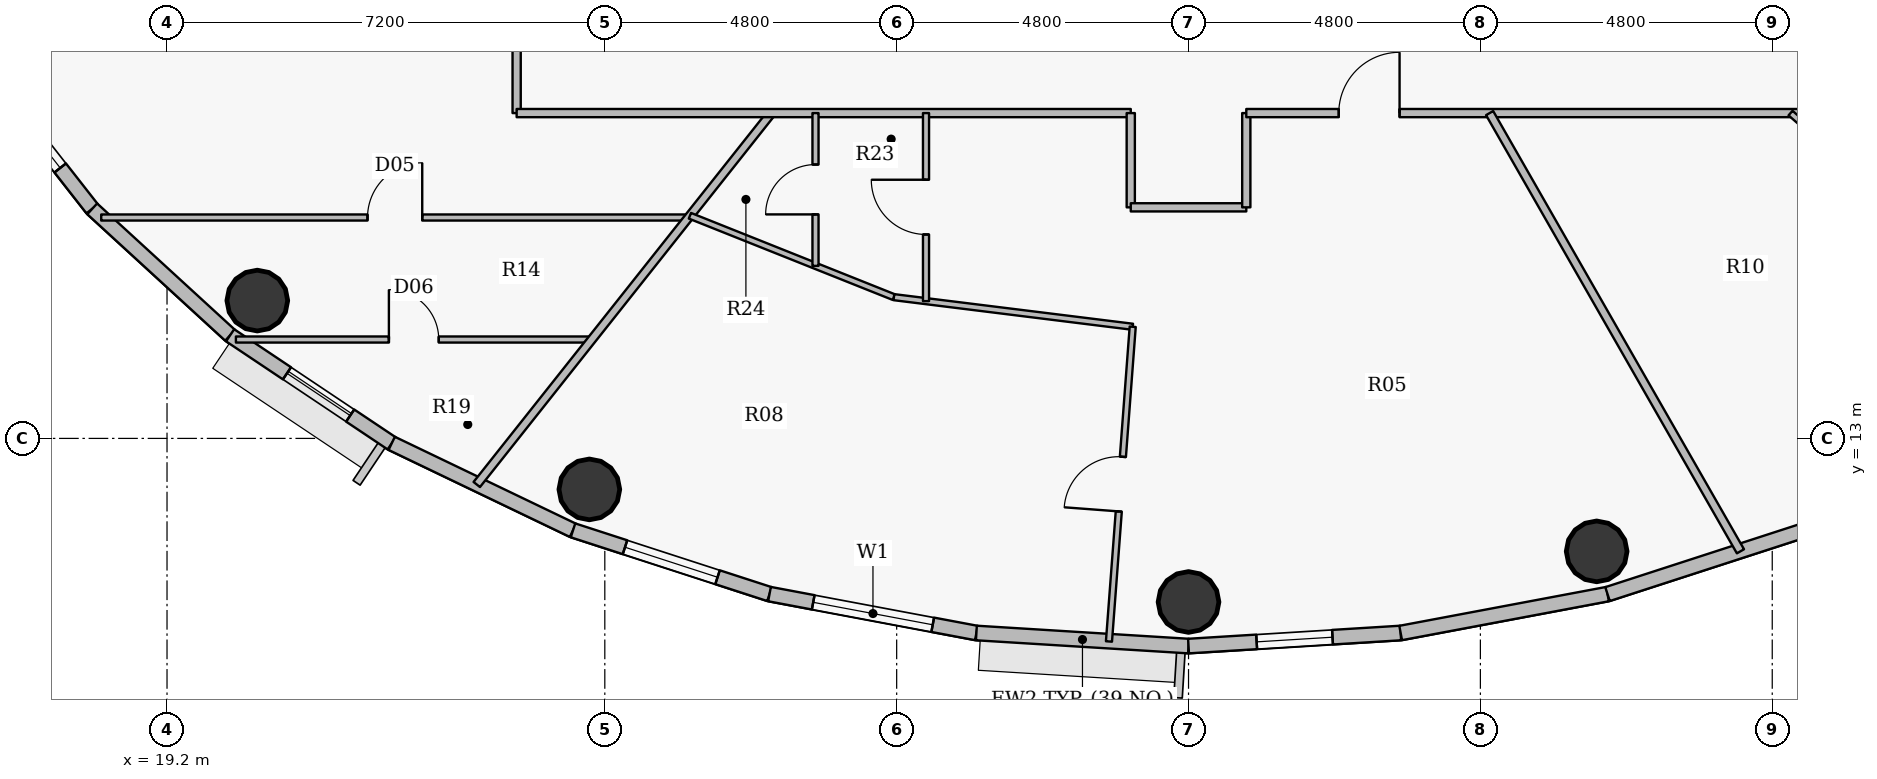
"""IFC4 building model, lengths in metres.
Left out: names, types, materials, properties, quantities, classifications, styles, units other than length and angle.
Written with IfcOpenShell. Run it as: python <this file> out.ifc"""

import sys

from ifc_helpers import new_model, si_unit, direction, frame, frame_2d, origin, origin_2d, place, context, subcontext, project, spatial, rectangle, hollow_circle, extrude, source, transform, mapped, element, fill, save


model = new_model("IFC4")
c1 = context("Model", 3, precision=1e-05, world=origin(), true_north=direction((0.0, 1.0)))
c2 = subcontext(c1, "Body", "Model", "MODEL_VIEW")
j1 = project(units=[si_unit("LENGTHUNIT", "METRE"), si_unit("PLANEANGLEUNIT", "RADIAN")], contexts=[c1])
p1 = place(None, origin())
s1 = spatial("IfcSite", under=j1, at=p1, CompositionType="ELEMENT")
p2 = place(p1, origin())
s2 = spatial("IfcBuilding", under=s1, at=p2, CompositionType="ELEMENT")
p3 = place(p2, frame((0.0, 0.0, 280.5)))
s3 = spatial("IfcBuildingStorey", under=s2, at=p3, CompositionType="ELEMENT", Elevation=280.5)
for number, where, z_axis, x_axis in (
    (1, (20.685, 15.267, 0.0), (0.0, 0.0, 1.0), (1.0, 0.0, 0.0)),
    (2, (26.146, 12.161, 0.0), (0.0, 0.0, 1.0), (1.0, 0.0, 0.0)),
    (3, (36.0, 10.31, 0.0), (0.0, 0.0, 1.0), (1.0, 0.0, 0.0)),
    (4, (42.712, 11.142, 0.0), (0.0, 0.0, 1.0), (1.0, 0.0, 0.0)),
):
    element("IfcColumn", number, at=place(p3, frame(where, z_axis=z_axis, x_axis=x_axis)), inside=s3, PredefinedType="COLUMN", context=c2, shape_type="SweptSolid", body=[
        extrude(hollow_circle(Radius=0.5, WallThickness=0.032, at=origin_2d()), origin(), (0.0, 0.0, 1.0), 3.75),
    ])
p4 = place(p3, frame((17.97, 16.775, 0.0), z_axis=(0.0, 0.0, 1.0), x_axis=(-0.616337186556, 0.787482363275, 0.0)))
e5 = element("IfcWall", 5, at=p4, inside=s3, PredefinedType="SOLIDWALL", context=c2, shape_type="SweptSolid", body=[
    extrude(rectangle(XDim=2.958, YDim=0.24, at=frame_2d((1.479, 0.0))), origin(), (0.0, 0.0, 1.0), 3.5),
])
p5 = place(p4, frame((0.854, 0.0, 0.9)))
e6 = element("IfcOpeningElement", 6, at=p5, cuts=e5, PredefinedType="OPENING", context=c2, shape_type="SweptSolid", body=[
    extrude(rectangle(XDim=1.25, YDim=1.65, at=origin_2d()), frame((0.625, 0.13, 0.825), z_axis=(0.0, -1.0, 0.0), x_axis=(1.0, 0.0, 0.0)), (0.0, 0.0, 1.0), 0.26),
])
p6 = place(p3, frame((20.238, 14.696, 0.0), z_axis=(0.0, 0.0, 1.0), x_axis=(-0.737068506972, 0.675818034703, 0.0)))
e7 = element("IfcWall", 7, at=p6, inside=s3, PredefinedType="SOLIDWALL", context=c2, shape_type="SweptSolid", body=[
    extrude(rectangle(XDim=3.077, YDim=0.24, at=frame_2d((1.539, 0.0))), origin(), (0.0, 0.0, 1.0), 3.5),
])
p7 = place(p3, frame((22.896, 12.918, 0.0), z_axis=(0.0, 0.0, 1.0), x_axis=(-0.831250592635, 0.55589787933, 0.0)))
e8 = element("IfcWall", 8, at=p7, inside=s3, PredefinedType="SOLIDWALL", context=c2, shape_type="SweptSolid", body=[
    extrude(rectangle(XDim=3.197, YDim=0.24, at=frame_2d((1.599, 0.0))), origin(), (0.0, 0.0, 1.0), 3.5),
])
p8 = place(p7, frame((0.822, 0.0, 0.9)))
e9 = element("IfcOpeningElement", 9, at=p8, cuts=e8, PredefinedType="OPENING", context=c2, shape_type="SweptSolid", body=[
    extrude(rectangle(XDim=1.25, YDim=1.65, at=origin_2d()), frame((0.625, 0.13, 0.825), z_axis=(0.0, -1.0, 0.0), x_axis=(1.0, 0.0, 0.0)), (0.0, 0.0, 1.0), 0.26),
])
p9 = place(p3, frame((25.877, 11.488, 0.0), z_axis=(0.0, 0.0, 1.0), x_axis=(-0.901573741254, 0.43262546051, 0.0)))
e10 = element("IfcWall", 10, at=p9, inside=s3, PredefinedType="SOLIDWALL", context=c2, shape_type="SweptSolid", body=[
    extrude(rectangle(XDim=3.307, YDim=0.24, at=frame_2d((1.653, 0.0))), origin(), (0.0, 0.0, 1.0), 3.5),
])
p10 = place(p3, frame((29.109, 10.44, 0.0), z_axis=(0.0, 0.0, 1.0), x_axis=(-0.95123136723, 0.308478339592, 0.0)))
e11 = element("IfcWall", 11, at=p10, inside=s3, PredefinedType="SOLIDWALL", context=c2, shape_type="SweptSolid", body=[
    extrude(rectangle(XDim=3.398, YDim=0.24, at=frame_2d((1.699, 0.0))), origin(), (0.0, 0.0, 1.0), 3.5),
])
p11 = place(p10, frame((0.899, 0.0, 0.9)))
e12 = element("IfcOpeningElement", 12, at=p11, cuts=e11, PredefinedType="OPENING", context=c2, shape_type="SweptSolid", body=[
    extrude(rectangle(XDim=1.6, YDim=1.75, at=origin_2d()), frame((0.8, 0.13, 0.875), z_axis=(0.0, -1.0, 0.0), x_axis=(1.0, 0.0, 0.0)), (0.0, 0.0, 1.0), 0.26),
])
p12 = place(p3, frame((32.511, 9.8, 0.0), z_axis=(0.0, 0.0, 1.0), x_axis=(-0.982782655757, 0.184765395959, 0.0)))
e13 = element("IfcWall", 13, at=p12, inside=s3, PredefinedType="SOLIDWALL", context=c2, shape_type="SweptSolid", body=[
    extrude(rectangle(XDim=3.462, YDim=0.24, at=frame_2d((1.731, 0.0))), origin(), (0.0, 0.0, 1.0), 3.5),
])
p13 = place(p12, frame((0.731, 0.0, 0.9)))
e14 = element("IfcOpeningElement", 14, at=p13, cuts=e13, PredefinedType="OPENING", context=c2, shape_type="SweptSolid", body=[
    extrude(rectangle(XDim=2.0, YDim=1.75, at=origin_2d()), frame((1.0, 0.13, 0.875), z_axis=(0.0, -1.0, 0.0), x_axis=(1.0, 0.0, 0.0)), (0.0, 0.0, 1.0), 0.26),
])
p14 = place(p3, frame((36.0, 9.585, 0.0), z_axis=(0.0, 0.0, 1.0), x_axis=(-0.998104946479, 0.061534671648, 0.0)))
e15 = element("IfcWall", 15, at=p14, inside=s3, PredefinedType="SOLIDWALL", context=c2, shape_type="SweptSolid", body=[
    extrude(rectangle(XDim=3.495, YDim=0.24, at=frame_2d((1.748, 0.0))), origin(), (0.0, 0.0, 1.0), 3.5),
])
p15 = place(p3, frame((39.489, 9.8, 0.0), z_axis=(0.0, 0.0, 1.0), x_axis=(-0.998104946479, -0.061534671648, 0.0)))
e16 = element("IfcWall", 16, at=p15, inside=s3, PredefinedType="SOLIDWALL", context=c2, shape_type="SweptSolid", body=[
    extrude(rectangle(XDim=3.495, YDim=0.24, at=frame_2d((1.748, 0.0))), origin(), (0.0, 0.0, 1.0), 3.5),
])
p16 = place(p15, frame((1.123, 0.0, 0.9)))
e17 = element("IfcOpeningElement", 17, at=p16, cuts=e16, PredefinedType="OPENING", context=c2, shape_type="SweptSolid", body=[
    extrude(rectangle(XDim=1.25, YDim=1.65, at=origin_2d()), frame((0.625, 0.13, 0.825), z_axis=(0.0, -1.0, 0.0), x_axis=(1.0, 0.0, 0.0)), (0.0, 0.0, 1.0), 0.26),
])
p17 = place(p3, frame((42.891, 10.44, 0.0), z_axis=(0.0, 0.0, 1.0), x_axis=(-0.982782655757, -0.184765395959, 0.0)))
e18 = element("IfcWall", 18, at=p17, inside=s3, PredefinedType="SOLIDWALL", context=c2, shape_type="SweptSolid", body=[
    extrude(rectangle(XDim=3.462, YDim=0.24, at=frame_2d((1.731, 0.0))), origin(), (0.0, 0.0, 1.0), 3.5),
])
p18 = place(p3, frame((46.123, 11.488, 0.0), z_axis=(0.0, 0.0, 1.0), x_axis=(-0.95123136723, -0.308478339592, 0.0)))
e19 = element("IfcWall", 19, at=p18, inside=s3, PredefinedType="SOLIDWALL", context=c2, shape_type="SweptSolid", body=[
    extrude(rectangle(XDim=3.398, YDim=0.24, at=frame_2d((1.699, 0.0))), origin(), (0.0, 0.0, 1.0), 3.5),
])
p19 = place(p3, frame((18.118, 16.633, 0.0), z_axis=(0.0, 0.0, 1.0), x_axis=(1.0, 0.0, 0.0)))
e20 = element("IfcWall", 20, at=p19, inside=s3, PredefinedType="PARTITIONING", context=c2, shape_type="SweptSolid", body=[
    extrude(rectangle(XDim=9.659, YDim=0.1, at=frame_2d((4.83, 0.0))), origin(), (0.0, 0.0, 1.0), 2.985),
])
p20 = place(p19, frame((4.379, 0.0, 0.0)))
e21 = element("IfcOpeningElement", 21, at=p20, cuts=e20, PredefinedType="OPENING", context=c2, shape_type="SweptSolid", body=[
    extrude(rectangle(XDim=0.9, YDim=2.1, at=origin_2d()), frame((0.45, 0.06, 1.05), z_axis=(0.0, -1.0, 0.0), x_axis=(1.0, 0.0, 0.0)), (0.0, 0.0, 1.0), 0.12),
])
p21 = place(p3, frame((20.333, 14.626, 0.0), z_axis=(0.0, 0.0, 1.0), x_axis=(1.0, 0.0, 0.0)))
e22 = element("IfcWall", 22, at=p21, inside=s3, PredefinedType="PARTITIONING", context=c2, shape_type="SweptSolid", body=[
    extrude(rectangle(XDim=5.852, YDim=0.1, at=frame_2d((2.926, 0.0))), origin(), (0.0, 0.0, 1.0), 2.985),
])
p22 = place(p21, frame((2.516, 0.0, 0.0)))
e23 = element("IfcOpeningElement", 23, at=p22, cuts=e22, PredefinedType="OPENING", context=c2, shape_type="SweptSolid", body=[
    extrude(rectangle(XDim=0.82, YDim=2.1, at=origin_2d()), frame((0.41, 0.06, 1.05), z_axis=(0.0, -1.0, 0.0), x_axis=(1.0, 0.0, 0.0)), (0.0, 0.0, 1.0), 0.12),
])
p23 = place(p3, frame((24.294, 12.242, 0.0), z_axis=(0.0, 0.0, 1.0), x_axis=(0.621439784824, 0.783461928774, 0.0)))
e24 = element("IfcWall", 24, at=p23, inside=s3, PredefinedType="PARTITIONING", context=c2, shape_type="SweptSolid", body=[
    extrude(rectangle(XDim=7.796, YDim=0.135, at=frame_2d((3.898, 0.0))), origin(), (0.0, 0.0, 1.0), 2.985),
])
p24 = place(p3, frame((24.95, 18.35, 0.0), z_axis=(0.0, 0.0, 1.0), x_axis=(0.0, 1.0, 0.0)))
e25 = element("IfcWall", 25, at=p24, inside=s3, PredefinedType="PARTITIONING", context=c2, shape_type="SweptSolid", body=[
    extrude(rectangle(XDim=17.3, YDim=0.135, at=frame_2d((8.65, 0.0))), origin(), (0.0, 0.0, 1.0), 3.035),
])
p25 = place(p24, frame((5.495, 0.0, 0.0)))
e26 = element("IfcOpeningElement", 26, at=p25, cuts=e25, PredefinedType="OPENING", context=c2, shape_type="SweptSolid", body=[
    extrude(rectangle(XDim=1.0, YDim=2.15, at=origin_2d()), frame((0.5, 0.078, 1.075), z_axis=(0.0, -1.0, 0.0), x_axis=(1.0, 0.0, 0.0)), (0.0, 0.0, 1.0), 0.155),
])
p26 = place(p3, frame((24.95, 18.35, 0.0), z_axis=(0.0, 0.0, 1.0), x_axis=(1.0, 0.0, 0.0)))
e27 = element("IfcWall", 27, at=p26, inside=s3, PredefinedType="PARTITIONING", context=c2, shape_type="SweptSolid", body=[
    extrude(rectangle(XDim=10.1, YDim=0.135, at=frame_2d((5.05, 0.0))), origin(), (0.0, 0.0, 1.0), 3.035),
])
p27 = place(p3, frame((27.8, 16.662, 0.0), z_axis=(0.0, 0.0, 1.0), x_axis=(0.928783988526, -0.370621508628, 0.0)))
e28 = element("IfcWall", 28, at=p27, inside=s3, PredefinedType="PARTITIONING", context=c2, shape_type="SweptSolid", body=[
    extrude(rectangle(XDim=3.613, YDim=0.1, at=frame_2d((1.806, 0.0))), origin(), (0.0, 0.0, 1.0), 3.035),
])
p28 = place(p3, frame((29.865, 15.837, 0.0), z_axis=(0.0, 0.0, 1.0), x_axis=(0.0, 1.0, 0.0)))
e29 = element("IfcWall", 29, at=p28, inside=s3, PredefinedType="PARTITIONING", context=c2, shape_type="SweptSolid", body=[
    extrude(rectangle(XDim=2.513, YDim=0.1, at=frame_2d((1.256, 0.0))), origin(), (0.0, 0.0, 1.0), 3.035),
])
p29 = place(p28, frame((0.846, 0.0, 0.0)))
e30 = element("IfcOpeningElement", 30, at=p29, cuts=e29, PredefinedType="OPENING", context=c2, shape_type="SweptSolid", body=[
    extrude(rectangle(XDim=0.82, YDim=2.1, at=origin_2d()), frame((0.41, 0.06, 1.05), z_axis=(0.0, -1.0, 0.0), x_axis=(1.0, 0.0, 0.0)), (0.0, 0.0, 1.0), 0.12),
])
p30 = place(p3, frame((31.155, 15.323, 0.0), z_axis=(0.0, 0.0, 1.0), x_axis=(0.992397939869, -0.123070422704, 0.0)))
e31 = element("IfcWall", 31, at=p30, inside=s3, PredefinedType="PARTITIONING", context=c2, shape_type="SweptSolid", body=[
    extrude(rectangle(XDim=3.958, YDim=0.1, at=frame_2d((1.979, 0.0))), origin(), (0.0, 0.0, 1.0), 3.5),
])
p31 = place(p3, frame((31.683, 15.258, 0.0), z_axis=(0.0, 0.0, 1.0), x_axis=(0.0, 1.0, 0.0)))
e32 = element("IfcWall", 32, at=p31, inside=s3, PredefinedType="PARTITIONING", context=c2, shape_type="SweptSolid", body=[
    extrude(rectangle(XDim=3.093, YDim=0.1, at=frame_2d((1.546, 0.0))), origin(), (0.0, 0.0, 1.0), 3.5),
])
p32 = place(p31, frame((1.096, 0.0, 0.0)))
e33 = element("IfcOpeningElement", 33, at=p32, cuts=e32, PredefinedType="OPENING", context=c2, shape_type="SweptSolid", body=[
    extrude(rectangle(XDim=0.9, YDim=2.1, at=origin_2d()), frame((0.45, 0.06, 1.05), z_axis=(0.0, -1.0, 0.0), x_axis=(1.0, 0.0, 0.0)), (0.0, 0.0, 1.0), 0.12),
])
p33 = place(p3, frame((34.691, 9.661, 0.0), z_axis=(0.0, 0.0, 1.0), x_axis=(0.0752647297, 0.997163587614, 0.0)))
e34 = element("IfcWall", 34, at=p33, inside=s3, PredefinedType="PARTITIONING", context=c2, shape_type="SweptSolid", body=[
    extrude(rectangle(XDim=5.19, YDim=0.1, at=frame_2d((2.595, 0.0))), origin(), (0.0, 0.0, 1.0), 2.985),
])
p34 = place(p33, frame((2.145, 0.0, 0.0)))
e35 = element("IfcOpeningElement", 35, at=p34, cuts=e34, PredefinedType="OPENING", context=c2, shape_type="SweptSolid", body=[
    extrude(rectangle(XDim=0.9, YDim=2.1, at=origin_2d()), frame((0.45, 0.06, 1.05), z_axis=(0.0, -1.0, 0.0), x_axis=(1.0, 0.0, 0.0)), (0.0, 0.0, 1.0), 0.12),
])
p35 = place(p3, frame((35.05, 16.8, 0.0), z_axis=(0.0, 0.0, 1.0), x_axis=(0.0, 1.0, 0.0)))
e36 = element("IfcWall", 36, at=p35, inside=s3, PredefinedType="PARTITIONING", context=c2, shape_type="SweptSolid", body=[
    extrude(rectangle(XDim=1.55, YDim=0.135, at=frame_2d((0.775, 0.0))), origin(), (0.0, 0.0, 1.0), 3.5),
])
p36 = place(p3, frame((35.05, 16.8, 0.0), z_axis=(0.0, 0.0, 1.0), x_axis=(1.0, 0.0, 0.0)))
e37 = element("IfcWall", 37, at=p36, inside=s3, PredefinedType="PARTITIONING", context=c2, shape_type="SweptSolid", body=[
    extrude(rectangle(XDim=1.9, YDim=0.135, at=frame_2d((0.95, 0.0))), origin(), (0.0, 0.0, 1.0), 3.035),
])
p37 = place(p3, frame((36.95, 16.8, 0.0), z_axis=(0.0, 0.0, 1.0), x_axis=(0.0, 1.0, 0.0)))
e38 = element("IfcWall", 38, at=p37, inside=s3, PredefinedType="PARTITIONING", context=c2, shape_type="SweptSolid", body=[
    extrude(rectangle(XDim=1.55, YDim=0.135, at=frame_2d((0.775, 0.0))), origin(), (0.0, 0.0, 1.0), 3.5),
])
p38 = place(p3, frame((36.95, 18.35, 0.0), z_axis=(0.0, 0.0, 1.0), x_axis=(1.0, 0.0, 0.0)))
e39 = element("IfcWall", 39, at=p38, inside=s3, PredefinedType="PARTITIONING", context=c2, shape_type="SweptSolid", body=[
    extrude(rectangle(XDim=10.1, YDim=0.135, at=frame_2d((5.05, 0.0))), origin(), (0.0, 0.0, 1.0), 3.035),
])
p39 = place(p38, frame((1.521, 0.0, 0.0)))
e40 = element("IfcOpeningElement", 40, at=p39, cuts=e39, PredefinedType="OPENING", context=c2, shape_type="SweptSolid", body=[
    extrude(rectangle(XDim=1.0, YDim=2.15, at=origin_2d()), frame((0.5, 0.078, 1.075), z_axis=(0.0, -1.0, 0.0), x_axis=(1.0, 0.0, 0.0)), (0.0, 0.0, 1.0), 0.155),
])
p40 = place(p3, frame((40.952, 18.35, 0.0), z_axis=(0.0, 0.0, 1.0), x_axis=(0.496803688517, -0.867862947173, 0.0)))
e41 = element("IfcWall", 41, at=p40, inside=s3, PredefinedType="PARTITIONING", context=c2, shape_type="SweptSolid", body=[
    extrude(rectangle(XDim=8.304, YDim=0.135, at=frame_2d((4.152, 0.0))), origin(), (0.0, 0.0, 1.0), 2.985),
])
p41 = place(p3, frame((45.901, 18.35, 0.0), z_axis=(0.0, 0.0, 1.0), x_axis=(0.753056223084, -0.657956172457, 0.0)))
e42 = element("IfcWall", 42, at=p41, inside=s3, PredefinedType="PARTITIONING", context=c2, shape_type="SweptSolid", body=[
    extrude(rectangle(XDim=6.526, YDim=0.1, at=frame_2d((3.263, 0.0))), origin(), (0.0, 0.0, 1.0), 2.985),
])
p42 = place(p41, frame((2.813, 0.0, 0.0)))
e43 = element("IfcOpeningElement", 43, at=p42, cuts=e42, PredefinedType="OPENING", context=c2, shape_type="SweptSolid", body=[
    extrude(rectangle(XDim=0.9, YDim=2.1, at=origin_2d()), frame((0.45, 0.06, 1.05), z_axis=(0.0, -1.0, 0.0), x_axis=(1.0, 0.0, 0.0)), (0.0, 0.0, 1.0), 0.12),
])
m1 = source(origin(), c2, "Body", "SweptSolid", [
    extrude(rectangle(XDim=1.25, YDim=1.65, at=origin_2d()), frame((0.625, 0.03, 0.825), z_axis=(0.0, -1.0, 0.0), x_axis=(1.0, 0.0, 0.0)), (0.0, 0.0, 1.0), 0.06),
])
p43 = place(p5, origin())
e44 = element("IfcWindow", 44, at=p43, inside=s3, PartitioningType="SINGLE_PANEL", PredefinedType="WINDOW", context=c2, shape_type="MappedRepresentation", body=[
    mapped(m1, transform((0.0, 0.0, 0.0), x_axis=(1.0, 0.0, 0.0), y_axis=(0.0, 1.0, 0.0), z_axis=(0.0, 0.0, 1.0), scale=1.0)),
])
fill(e6, e44)
p44 = place(p8, origin())
e45 = element("IfcWindow", 45, at=p44, inside=s3, PartitioningType="SINGLE_PANEL", PredefinedType="WINDOW", context=c2, shape_type="MappedRepresentation", body=[
    mapped(m1, transform((0.0, 0.0, 0.0), x_axis=(1.0, 0.0, 0.0), y_axis=(0.0, 1.0, 0.0), z_axis=(0.0, 0.0, 1.0), scale=1.0)),
])
fill(e9, e45)
m2 = source(origin(), c2, "Body", "SweptSolid", [
    extrude(rectangle(XDim=1.6, YDim=1.75, at=origin_2d()), frame((0.8, 0.03, 0.875), z_axis=(0.0, -1.0, 0.0), x_axis=(1.0, 0.0, 0.0)), (0.0, 0.0, 1.0), 0.06),
])
p45 = place(p11, origin())
e46 = element("IfcWindow", 46, at=p45, inside=s3, PartitioningType="DOUBLE_PANEL_VERTICAL", PredefinedType="WINDOW", context=c2, shape_type="MappedRepresentation", body=[
    mapped(m2, transform((0.0, 0.0, 0.0), x_axis=(1.0, 0.0, 0.0), y_axis=(0.0, 1.0, 0.0), z_axis=(0.0, 0.0, 1.0), scale=1.0)),
])
fill(e12, e46)
m3 = source(origin(), c2, "Body", "SweptSolid", [
    extrude(rectangle(XDim=2.0, YDim=1.75, at=origin_2d()), frame((1.0, 0.03, 0.875), z_axis=(0.0, -1.0, 0.0), x_axis=(1.0, 0.0, 0.0)), (0.0, 0.0, 1.0), 0.06),
])
p46 = place(p13, origin())
e47 = element("IfcWindow", 47, at=p46, inside=s3, PartitioningType="DOUBLE_PANEL_VERTICAL", PredefinedType="WINDOW", context=c2, shape_type="MappedRepresentation", body=[
    mapped(m3, transform((0.0, 0.0, 0.0), x_axis=(1.0, 0.0, 0.0), y_axis=(0.0, 1.0, 0.0), z_axis=(0.0, 0.0, 1.0), scale=1.0)),
])
fill(e14, e47)
p47 = place(p16, origin())
e48 = element("IfcWindow", 48, at=p47, inside=s3, PartitioningType="SINGLE_PANEL", PredefinedType="WINDOW", context=c2, shape_type="MappedRepresentation", body=[
    mapped(m1, transform((0.0, 0.0, 0.0), x_axis=(1.0, 0.0, 0.0), y_axis=(0.0, 1.0, 0.0), z_axis=(0.0, 0.0, 1.0), scale=1.0)),
])
fill(e17, e48)
m4 = source(origin(), c2, "Body", "SweptSolid", [
    extrude(rectangle(XDim=0.9, YDim=2.1, at=origin_2d()), frame((0.45, 0.025, 1.05), z_axis=(0.0, -1.0, 0.0), x_axis=(1.0, 0.0, 0.0)), (0.0, 0.0, 1.0), 0.05),
])
p48 = place(p20, origin())
e49 = element("IfcDoor", 49, at=p48, inside=s3, OperationType="SINGLE_SWING_RIGHT", PredefinedType="DOOR", context=c2, shape_type="MappedRepresentation", body=[
    mapped(m4, transform((0.0, 0.0, 0.0), x_axis=(1.0, 0.0, 0.0), y_axis=(0.0, 1.0, 0.0), z_axis=(0.0, 0.0, 1.0), scale=1.0)),
])
fill(e21, e49)
m5 = source(origin(), c2, "Body", "SweptSolid", [
    extrude(rectangle(XDim=0.82, YDim=2.1, at=origin_2d()), frame((0.41, 0.025, 1.05), z_axis=(0.0, -1.0, 0.0), x_axis=(1.0, 0.0, 0.0)), (0.0, 0.0, 1.0), 0.05),
])
p49 = place(p22, origin())
e50 = element("IfcDoor", 50, at=p49, inside=s3, OperationType="SINGLE_SWING_LEFT", PredefinedType="DOOR", context=c2, shape_type="MappedRepresentation", body=[
    mapped(m5, transform((0.0, 0.0, 0.0), x_axis=(1.0, 0.0, 0.0), y_axis=(0.0, 1.0, 0.0), z_axis=(0.0, 0.0, 1.0), scale=1.0)),
])
fill(e23, e50)
m6 = source(origin(), c2, "Body", "SweptSolid", [
    extrude(rectangle(XDim=1.0, YDim=2.15, at=origin_2d()), frame((0.5, 0.025, 1.075), z_axis=(0.0, -1.0, 0.0), x_axis=(1.0, 0.0, 0.0)), (0.0, 0.0, 1.0), 0.05),
])
p50 = place(p39, origin())
e51 = element("IfcDoor", 51, at=p50, inside=s3, OperationType="SINGLE_SWING_RIGHT", PredefinedType="DOOR", context=c2, shape_type="MappedRepresentation", body=[
    mapped(m6, transform((0.0, 0.0, 0.0), x_axis=(1.0, 0.0, 0.0), y_axis=(0.0, 1.0, 0.0), z_axis=(0.0, 0.0, 1.0), scale=1.0)),
])
fill(e40, e51)
p51 = place(p34, origin())
e52 = element("IfcDoor", 52, at=p51, inside=s3, OperationType="SINGLE_SWING_LEFT", PredefinedType="DOOR", context=c2, shape_type="MappedRepresentation", body=[
    mapped(m4, transform((0.0, 0.0, 0.0), x_axis=(1.0, 0.0, 0.0), y_axis=(0.0, 1.0, 0.0), z_axis=(0.0, 0.0, 1.0), scale=1.0)),
])
fill(e35, e52)
p52 = place(p32, origin())
e53 = element("IfcDoor", 53, at=p52, inside=s3, OperationType="SINGLE_SWING_RIGHT", PredefinedType="DOOR", context=c2, shape_type="MappedRepresentation", body=[
    mapped(m4, transform((0.0, 0.0, 0.0), x_axis=(1.0, 0.0, 0.0), y_axis=(0.0, 1.0, 0.0), z_axis=(0.0, 0.0, 1.0), scale=1.0)),
])
fill(e33, e53)
p53 = place(p29, origin())
e54 = element("IfcDoor", 54, at=p53, inside=s3, OperationType="SINGLE_SWING_LEFT", PredefinedType="DOOR", context=c2, shape_type="MappedRepresentation", body=[
    mapped(m5, transform((0.0, 0.0, 0.0), x_axis=(1.0, 0.0, 0.0), y_axis=(0.0, 1.0, 0.0), z_axis=(0.0, 0.0, 1.0), scale=1.0)),
])
fill(e30, e54)
save(model, sys.argv[1])
